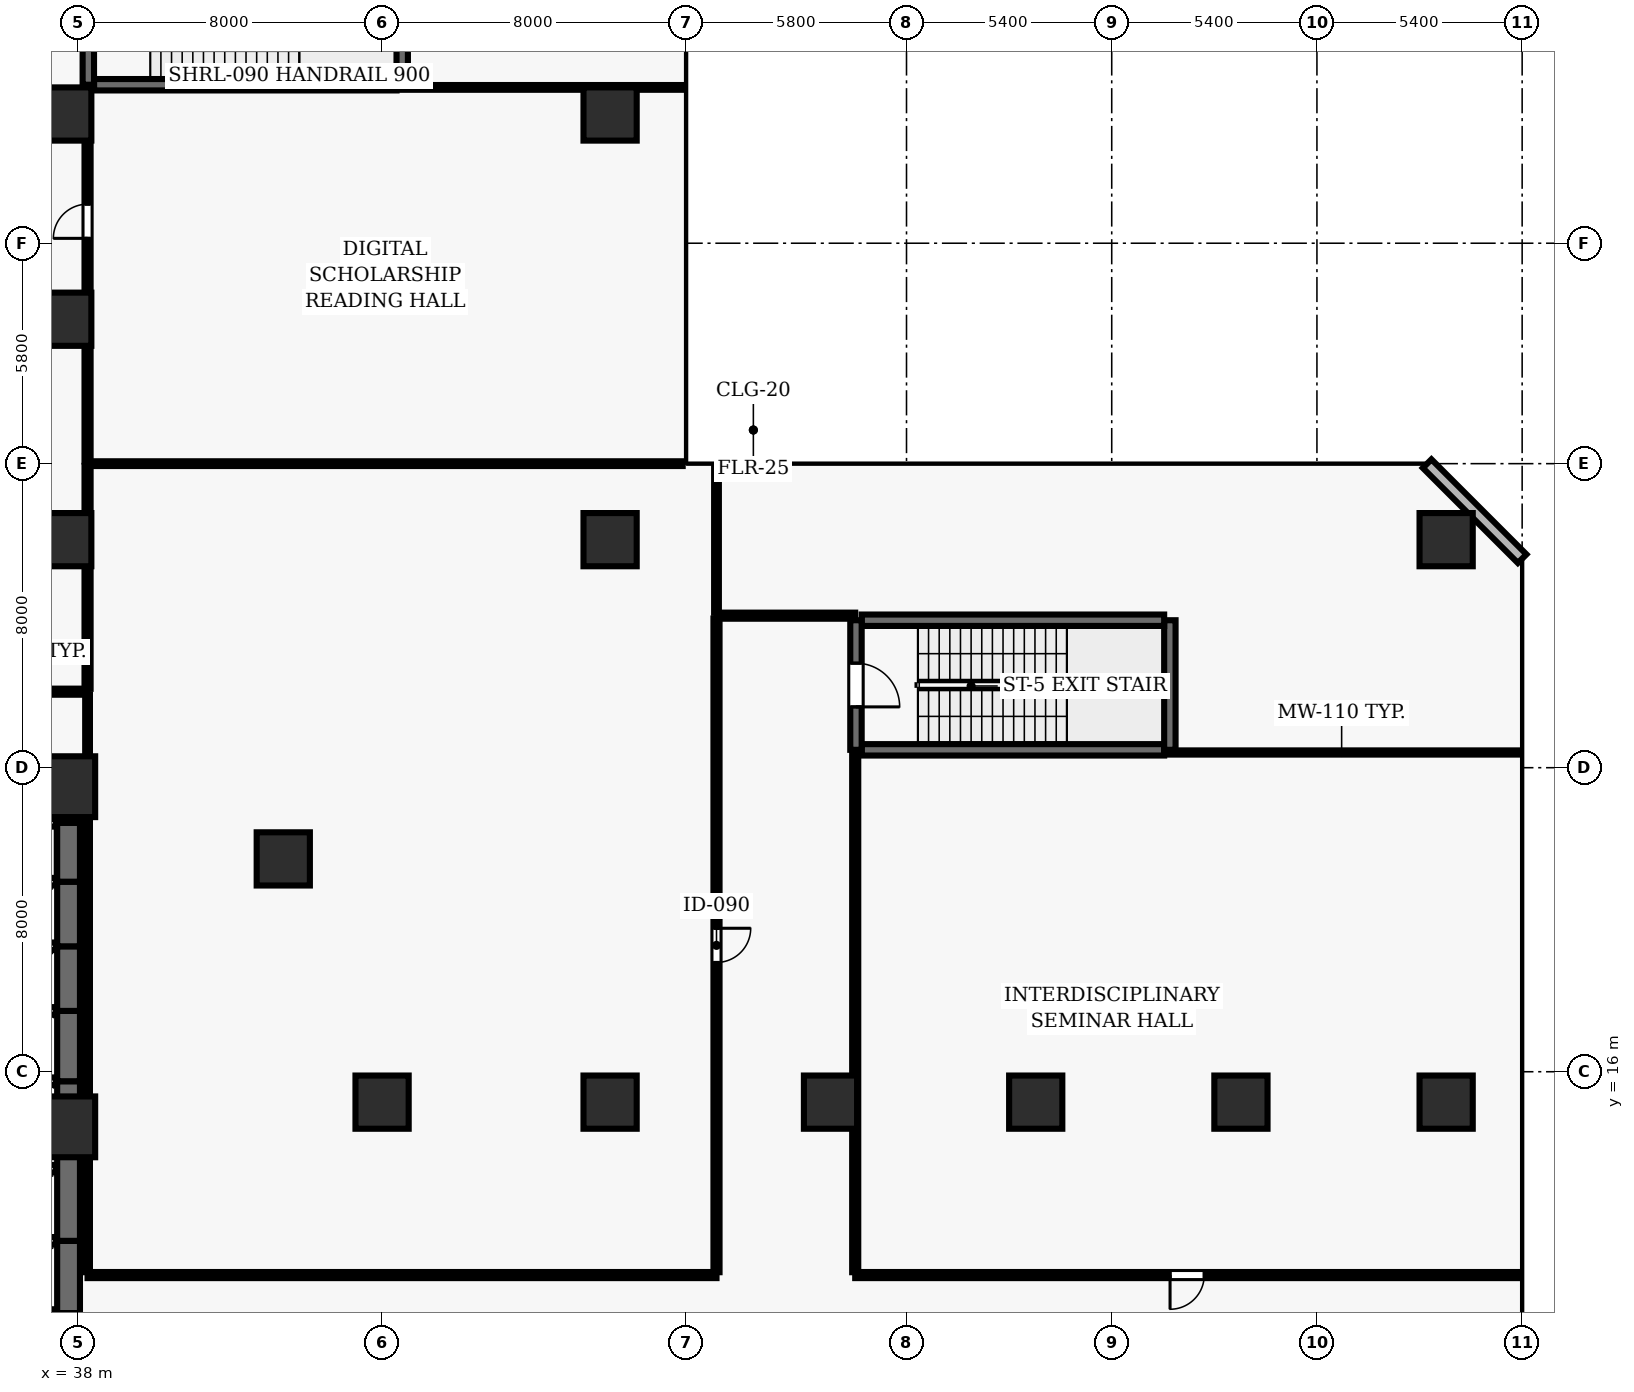
"""IFC4 building model, lengths in metres.
Left out: names, types, materials, properties, quantities, classifications, styles, units other than length and angle.
Written with IfcOpenShell. Run it as: python <this file> out.ifc"""

import sys

from ifc_helpers import new_model, si_unit, direction, frame, frame_2d, origin, origin_2d, place, context, subcontext, project, spatial, rectangle, extrude, element, fill, save


model = new_model("IFC4")
c1 = context("Model", 3, precision=1e-05, world=origin(), true_north=direction((0.0, 1.0)))
c2 = subcontext(c1, "Body", "Model", "MODEL_VIEW")
j1 = project(units=[si_unit("LENGTHUNIT", "METRE"), si_unit("PLANEANGLEUNIT", "RADIAN")], contexts=[c1])
p1 = place(None, origin())
s1 = spatial("IfcSite", under=j1, at=p1, CompositionType="ELEMENT")
p2 = place(p1, origin())
s2 = spatial("IfcBuilding", under=s1, at=p2, CompositionType="ELEMENT")
p3 = place(p2, frame((0.0, 0.0, 15.6)))
s3 = spatial("IfcBuildingStorey", under=s2, at=p3, CompositionType="ELEMENT", Elevation=15.6)
for number, where, z_axis, x_axis in (
    (1, (37.65, 14.55, 0.0), (0.0, 0.0, 1.0), (1.0, 0.0, 0.0)),
    (2, (37.65, 23.5, 0.0), (0.0, 0.0, 1.0), (1.0, 0.0, 0.0)),
):
    element("IfcColumn", number, at=place(p3, frame(where, z_axis=z_axis, x_axis=x_axis)), inside=s3, PredefinedType="COLUMN", context=c2, shape_type="SweptSolid", body=[
        extrude(rectangle(XDim=1.6, YDim=1.6, at=origin_2d()), origin(), (0.0, 0.0, 1.0), 5.2),
    ])
for number, where, z_axis, x_axis in (
    (3, (46.0, 15.2, 0.0), (0.0, 0.0, 1.0), (1.0, 0.0, 0.0)),
    (4, (52.0, 15.2, 0.0), (0.0, 0.0, 1.0), (1.0, 0.0, 0.0)),
    (5, (57.8, 15.2, 0.0), (0.0, 0.0, 1.0), (1.0, 0.0, 0.0)),
    (6, (63.2, 15.2, 0.0), (0.0, 0.0, 1.0), (1.0, 0.0, 0.0)),
    (7, (68.6, 15.2, 0.0), (0.0, 0.0, 1.0), (1.0, 0.0, 0.0)),
    (8, (74.0, 15.2, 0.0), (0.0, 0.0, 1.0), (1.0, 0.0, 0.0)),
    (9, (37.65, 30.0, 0.0), (0.0, 0.0, 1.0), (1.0, 0.0, 0.0)),
    (10, (37.65, 35.8, 0.0), (0.0, 0.0, 1.0), (1.0, 0.0, 0.0)),
    (11, (37.65, 41.2, 0.0), (0.0, 0.0, 1.0), (1.0, 0.0, 0.0)),
    (12, (43.4, 21.6, 0.0), (0.0, 0.0, 1.0), (1.0, 0.0, 0.0)),
    (13, (52.0, 30.0, 0.0), (0.0, 0.0, 1.0), (1.0, 0.0, 0.0)),
    (14, (74.0, 30.0, 0.0), (0.0, 0.0, 1.0), (1.0, 0.0, 0.0)),
    (15, (52.0, 41.2, 0.0), (0.0, 0.0, 1.0), (1.0, 0.0, 0.0)),
):
    element("IfcColumn", number, at=place(p3, frame(where, z_axis=z_axis, x_axis=x_axis)), inside=s3, PredefinedType="COLUMN", context=c2, shape_type="SweptSolid", body=[
        extrude(rectangle(XDim=1.4, YDim=1.4, at=origin_2d()), origin(), (0.0, 0.0, 1.0), 5.2),
    ])
p4 = place(p3, frame((76.0, 29.5, 0.0), z_axis=(0.0, 0.0, 1.0), x_axis=(-0.707106781187, 0.707106781187, 0.0)))
e16 = element("IfcWall", 16, at=p4, inside=s3, PredefinedType="SOLIDWALL", context=c2, shape_type="SweptSolid", body=[
    extrude(rectangle(XDim=3.536, YDim=0.32, at=frame_2d((1.768, 0.0))), origin(), (0.0, 0.0, 1.0), 4.92),
])
p5 = place(p3, frame((38.42, 41.97, 0.0), z_axis=(0.0, 0.0, 1.0), x_axis=(1.0, 0.0, 0.0)))
e17 = element("IfcWall", 17, at=p5, inside=s3, PredefinedType="SHEAR", context=c2, shape_type="SweptSolid", body=[
    extrude(rectangle(XDim=7.96, YDim=0.3, at=frame_2d((3.98, 0.0))), origin(), (0.0, 0.0, 1.0), 4.92),
])
p6 = place(p3, frame((46.53, 41.97, 0.0), z_axis=(0.0, 0.0, 1.0), x_axis=(0.0, 1.0, 0.0)))
e18 = element("IfcWall", 18, at=p6, inside=s3, PredefinedType="SHEAR", context=c2, shape_type="SweptSolid", body=[
    extrude(rectangle(XDim=3.41, YDim=0.3, at=frame_2d((1.705, 0.0))), origin(), (0.0, 0.0, 1.0), 4.92),
])
p7 = place(p3, frame((38.27, 45.92, 0.0), z_axis=(0.0, 0.0, 1.0), x_axis=(0.0, -1.0, 0.0)))
e19 = element("IfcWall", 19, at=p7, inside=s3, PredefinedType="SHEAR", context=c2, shape_type="SweptSolid", body=[
    extrude(rectangle(XDim=3.95, YDim=0.3, at=frame_2d((1.975, 0.0))), origin(), (0.0, 0.0, 1.0), 4.92),
])
p8 = place(p7, frame((1.67, 0.0, 0.0)))
e20 = element("IfcOpeningElement", 20, at=p8, cuts=e19, PredefinedType="OPENING", context=c2, shape_type="SweptSolid", body=[
    extrude(rectangle(XDim=1.15, YDim=2.15, at=frame_2d((0.575, 1.075))), frame((0.0, 0.16, 0.0), z_axis=(0.0, -1.0, 0.0), x_axis=(1.0, 0.0, 0.0)), (0.0, 0.0, 1.0), 0.32),
])
p9 = place(p3, frame((58.62, 24.47, 0.0), z_axis=(0.0, 0.0, 1.0), x_axis=(1.0, 0.0, 0.0)))
e21 = element("IfcWall", 21, at=p9, inside=s3, PredefinedType="SHEAR", context=c2, shape_type="SweptSolid", body=[
    extrude(rectangle(XDim=7.96, YDim=0.3, at=frame_2d((3.98, 0.0))), origin(), (0.0, 0.0, 1.0), 4.92),
])
p10 = place(p3, frame((66.73, 24.47, 0.0), z_axis=(0.0, 0.0, 1.0), x_axis=(0.0, 1.0, 0.0)))
e22 = element("IfcWall", 22, at=p10, inside=s3, PredefinedType="SHEAR", context=c2, shape_type="SweptSolid", body=[
    extrude(rectangle(XDim=3.41, YDim=0.3, at=frame_2d((1.705, 0.0))), origin(), (0.0, 0.0, 1.0), 4.92),
])
p11 = place(p3, frame((66.58, 27.88, 0.0), z_axis=(0.0, 0.0, 1.0), x_axis=(-1.0, 0.0, 0.0)))
e23 = element("IfcWall", 23, at=p11, inside=s3, PredefinedType="SHEAR", context=c2, shape_type="SweptSolid", body=[
    extrude(rectangle(XDim=7.96, YDim=0.3, at=frame_2d((3.98, 0.0))), origin(), (0.0, 0.0, 1.0), 4.92),
])
p12 = place(p3, frame((58.47, 27.88, 0.0), z_axis=(0.0, 0.0, 1.0), x_axis=(0.0, -1.0, 0.0)))
e24 = element("IfcWall", 24, at=p12, inside=s3, PredefinedType="SHEAR", context=c2, shape_type="SweptSolid", body=[
    extrude(rectangle(XDim=3.41, YDim=0.3, at=frame_2d((1.705, 0.0))), origin(), (0.0, 0.0, 1.0), 4.92),
])
p13 = place(p12, frame((1.13, 0.0, 0.0)))
e25 = element("IfcOpeningElement", 25, at=p13, cuts=e24, PredefinedType="OPENING", context=c2, shape_type="SweptSolid", body=[
    extrude(rectangle(XDim=1.15, YDim=2.15, at=frame_2d((0.575, 1.075))), frame((0.0, 0.16, 0.0), z_axis=(0.0, -1.0, 0.0), x_axis=(1.0, 0.0, 0.0)), (0.0, 0.0, 1.0), 0.32),
])
p14 = place(p3, frame((37.75, 9.65, 0.0), z_axis=(0.0, 0.0, 1.0), x_axis=(0.0, 1.0, 0.0)))
e26 = element("IfcWall", 26, at=p14, inside=s3, PredefinedType="SHEAR", context=c2, shape_type="SweptSolid", body=[
    extrude(rectangle(XDim=1.9, YDim=0.6, at=frame_2d((0.95, 0.0))), origin(), (0.0, 0.0, 1.0), 4.92),
])
for number, where, z_axis, x_axis in (
    (27, (35.28, 9.65, 0.0), (0.0, 0.0, 1.0), (1.0, 0.0, 0.0)),
    (28, (37.42, 11.55, 0.0), (0.0, 0.0, 1.0), (-1.0, 0.0, 0.0)),
):
    element("IfcWall", number, at=place(p3, frame(where, z_axis=z_axis, x_axis=x_axis)), inside=s3, PredefinedType="SOLIDWALL", context=c2, shape_type="SweptSolid", body=[
        extrude(rectangle(XDim=2.14, YDim=0.2, at=frame_2d((1.07, 0.0))), origin(), (0.0, 0.0, 1.0), 4.92),
    ])
p15 = place(p3, frame((37.75, 11.55, 0.0), z_axis=(0.0, 0.0, 1.0), x_axis=(0.0, 1.0, 0.0)))
e29 = element("IfcWall", 29, at=p15, inside=s3, PredefinedType="SHEAR", context=c2, shape_type="SweptSolid", body=[
    extrude(rectangle(XDim=2.35, YDim=0.6, at=frame_2d((1.175, 0.0))), origin(), (0.0, 0.0, 1.0), 4.92),
])
p16 = place(p3, frame((37.42, 13.45, 0.0), z_axis=(0.0, 0.0, 1.0), x_axis=(-1.0, 0.0, 0.0)))
e30 = element("IfcWall", 30, at=p16, inside=s3, PredefinedType="SOLIDWALL", context=c2, shape_type="SweptSolid", body=[
    extrude(rectangle(XDim=2.14, YDim=0.2, at=frame_2d((1.07, 0.0))), origin(), (0.0, 0.0, 1.0), 4.92),
])
p17 = place(p3, frame((37.75, 13.9, 0.0), z_axis=(0.0, 0.0, 1.0), x_axis=(0.0, 1.0, 0.0)))
e31 = element("IfcWall", 31, at=p17, inside=s3, PredefinedType="SHEAR", context=c2, shape_type="SweptSolid", body=[
    extrude(rectangle(XDim=1.85, YDim=0.6, at=frame_2d((0.925, 0.0))), origin(), (0.0, 0.0, 1.0), 4.92),
])
for number, where, z_axis, x_axis in (
    (32, (35.28, 13.9, 0.0), (0.0, 0.0, 1.0), (1.0, 0.0, 0.0)),
    (33, (37.42, 15.75, 0.0), (0.0, 0.0, 1.0), (-1.0, 0.0, 0.0)),
):
    element("IfcWall", number, at=place(p3, frame(where, z_axis=z_axis, x_axis=x_axis)), inside=s3, PredefinedType="SOLIDWALL", context=c2, shape_type="SweptSolid", body=[
        extrude(rectangle(XDim=2.14, YDim=0.2, at=frame_2d((1.07, 0.0))), origin(), (0.0, 0.0, 1.0), 4.92),
    ])
p18 = place(p3, frame((37.75, 15.75, 0.0), z_axis=(0.0, 0.0, 1.0), x_axis=(0.0, 1.0, 0.0)))
e34 = element("IfcWall", 34, at=p18, inside=s3, PredefinedType="SHEAR", context=c2, shape_type="SweptSolid", body=[
    extrude(rectangle(XDim=1.85, YDim=0.6, at=frame_2d((0.925, 0.0))), origin(), (0.0, 0.0, 1.0), 4.92),
])
p19 = place(p3, frame((37.42, 17.6, 0.0), z_axis=(0.0, 0.0, 1.0), x_axis=(-1.0, 0.0, 0.0)))
e35 = element("IfcWall", 35, at=p19, inside=s3, PredefinedType="SOLIDWALL", context=c2, shape_type="SweptSolid", body=[
    extrude(rectangle(XDim=2.14, YDim=0.2, at=frame_2d((1.07, 0.0))), origin(), (0.0, 0.0, 1.0), 4.92),
])
p20 = place(p3, frame((37.75, 17.6, 0.0), z_axis=(0.0, 0.0, 1.0), x_axis=(0.0, 1.0, 0.0)))
e36 = element("IfcWall", 36, at=p20, inside=s3, PredefinedType="SHEAR", context=c2, shape_type="SweptSolid", body=[
    extrude(rectangle(XDim=1.7, YDim=0.6, at=frame_2d((0.85, 0.0))), origin(), (0.0, 0.0, 1.0), 4.92),
])
p21 = place(p3, frame((37.42, 19.3, 0.0), z_axis=(0.0, 0.0, 1.0), x_axis=(-1.0, 0.0, 0.0)))
e37 = element("IfcWall", 37, at=p21, inside=s3, PredefinedType="SOLIDWALL", context=c2, shape_type="SweptSolid", body=[
    extrude(rectangle(XDim=2.14, YDim=0.2, at=frame_2d((1.07, 0.0))), origin(), (0.0, 0.0, 1.0), 4.92),
])
p22 = place(p3, frame((37.75, 19.3, 0.0), z_axis=(0.0, 0.0, 1.0), x_axis=(0.0, 1.0, 0.0)))
e38 = element("IfcWall", 38, at=p22, inside=s3, PredefinedType="SHEAR", context=c2, shape_type="SweptSolid", body=[
    extrude(rectangle(XDim=1.7, YDim=0.6, at=frame_2d((0.85, 0.0))), origin(), (0.0, 0.0, 1.0), 4.92),
])
p23 = place(p3, frame((37.42, 21.0, 0.0), z_axis=(0.0, 0.0, 1.0), x_axis=(-1.0, 0.0, 0.0)))
e39 = element("IfcWall", 39, at=p23, inside=s3, PredefinedType="SOLIDWALL", context=c2, shape_type="SweptSolid", body=[
    extrude(rectangle(XDim=2.14, YDim=0.2, at=frame_2d((1.07, 0.0))), origin(), (0.0, 0.0, 1.0), 4.92),
])
p24 = place(p3, frame((37.75, 21.0, 0.0), z_axis=(0.0, 0.0, 1.0), x_axis=(0.0, 1.0, 0.0)))
e40 = element("IfcWall", 40, at=p24, inside=s3, PredefinedType="SHEAR", context=c2, shape_type="SweptSolid", body=[
    extrude(rectangle(XDim=1.55, YDim=0.6, at=frame_2d((0.775, 0.0))), origin(), (0.0, 0.0, 1.0), 4.92),
])
p25 = place(p3, frame((37.42, 22.55, 0.0), z_axis=(0.0, 0.0, 1.0), x_axis=(-1.0, 0.0, 0.0)))
e41 = element("IfcWall", 41, at=p25, inside=s3, PredefinedType="SOLIDWALL", context=c2, shape_type="SweptSolid", body=[
    extrude(rectangle(XDim=2.14, YDim=0.2, at=frame_2d((1.07, 0.0))), origin(), (0.0, 0.0, 1.0), 4.92),
])
p26 = place(p3, frame((37.75, 22.55, 0.0), z_axis=(0.0, 0.0, 1.0), x_axis=(0.0, 1.0, 0.0)))
e42 = element("IfcWall", 42, at=p26, inside=s3, PredefinedType="SHEAR", context=c2, shape_type="SweptSolid", body=[
    extrude(rectangle(XDim=1.5, YDim=0.6, at=frame_2d((0.75, 0.0))), origin(), (0.0, 0.0, 1.0), 4.92),
])
p27 = place(p3, frame((37.42, 24.05, 0.0), z_axis=(0.0, 0.0, 1.0), x_axis=(-1.0, 0.0, 0.0)))
e43 = element("IfcWall", 43, at=p27, inside=s3, PredefinedType="SOLIDWALL", context=c2, shape_type="SweptSolid", body=[
    extrude(rectangle(XDim=2.14, YDim=0.2, at=frame_2d((1.07, 0.0))), origin(), (0.0, 0.0, 1.0), 4.92),
])
p28 = place(p3, frame((35.15, 26.0, 0.0), z_axis=(0.0, 0.0, 1.0), x_axis=(1.0, 0.0, 0.0)))
e44 = element("IfcWall", 44, at=p28, inside=s3, PredefinedType="PARTITIONING", context=c2, shape_type="SweptSolid", body=[
    extrude(rectangle(XDim=3.1, YDim=0.16, at=frame_2d((1.55, 0.0))), origin(), (0.0, 0.0, 1.0), 4.92),
])
p29 = place(p3, frame((38.25, 32.0, 0.0), z_axis=(0.0, 0.0, 1.0), x_axis=(1.0, 0.0, 0.0)))
e45 = element("IfcWall", 45, at=p29, inside=s3, PredefinedType="PARTITIONING", context=c2, shape_type="SweptSolid", body=[
    extrude(rectangle(XDim=15.66, YDim=0.125, at=frame_2d((7.83, 0.0))), origin(), (0.0, 0.0, 1.0), 4.92),
])
p30 = place(p3, frame((53.91, 41.9, 0.0), z_axis=(0.0, 0.0, 1.0), x_axis=(-1.0, 0.0, 0.0)))
e46 = element("IfcWall", 46, at=p30, inside=s3, PredefinedType="PARTITIONING", context=c2, shape_type="SweptSolid", body=[
    extrude(rectangle(XDim=7.53, YDim=0.125, at=frame_2d((3.765, 0.0))), origin(), (0.0, 0.0, 1.0), 4.92),
])
p31 = place(p3, frame((54.8, 10.65, 0.0), z_axis=(0.0, 0.0, 1.0), x_axis=(-1.0, 0.0, 0.0)))
e47 = element("IfcWall", 47, at=p31, inside=s3, PredefinedType="PARTITIONING", context=c2, shape_type="SweptSolid", body=[
    extrude(rectangle(XDim=16.55, YDim=0.16, at=frame_2d((8.275, 0.0))), origin(), (0.0, 0.0, 1.0), 4.451),
])
p32 = place(p3, frame((58.45, 28.0, 0.0), z_axis=(0.0, 0.0, 1.0), x_axis=(-1.0, 0.0, 0.0)))
e48 = element("IfcWall", 48, at=p32, inside=s3, PredefinedType="PARTITIONING", context=c2, shape_type="SweptSolid", body=[
    extrude(rectangle(XDim=3.65, YDim=0.16, at=frame_2d((1.825, 0.0))), origin(), (0.0, 0.0, 1.0), 4.92),
])
p33 = place(p3, frame((75.92, 10.65, 0.0), z_axis=(0.0, 0.0, 1.0), x_axis=(-1.0, 0.0, 0.0)))
e49 = element("IfcWall", 49, at=p33, inside=s3, PredefinedType="PARTITIONING", context=c2, shape_type="SweptSolid", body=[
    extrude(rectangle(XDim=17.47, YDim=0.16, at=frame_2d((8.735, 0.0))), origin(), (0.0, 0.0, 1.0), 4.451),
])
p34 = place(p33, frame((8.285, 0.0, 0.0)))
e50 = element("IfcOpeningElement", 50, at=p34, cuts=e49, PredefinedType="OPENING", context=c2, shape_type="SweptSolid", body=[
    extrude(rectangle(XDim=0.9, YDim=2.1, at=frame_2d((0.45, 1.05))), frame((0.0, 0.09, 0.0), z_axis=(0.0, -1.0, 0.0), x_axis=(1.0, 0.0, 0.0)), (0.0, 0.0, 1.0), 0.18),
])
p35 = place(p3, frame((75.92, 24.4, 0.0), z_axis=(0.0, 0.0, 1.0), x_axis=(-1.0, 0.0, 0.0)))
e51 = element("IfcWall", 51, at=p35, inside=s3, PredefinedType="MOVABLE", context=c2, shape_type="SweptSolid", body=[
    extrude(rectangle(XDim=9.34, YDim=0.11, at=frame_2d((4.67, 0.0))), origin(), (0.0, 0.0, 1.0), 4.92),
])
p36 = place(p3, frame((38.25, 25.925, 0.0), z_axis=(0.0, 0.0, 1.0), x_axis=(0.0, -1.0, 0.0)))
e52 = element("IfcWall", 52, at=p36, inside=s3, PredefinedType="PARTITIONING", context=c2, shape_type="SweptSolid", body=[
    extrude(rectangle(XDim=15.2, YDim=0.125, at=frame_2d((7.6, 0.0))), origin(), (0.0, 0.0, 1.0), 4.92),
])
p37 = place(p3, frame((38.25, 26.075, 0.0), z_axis=(0.0, 0.0, 1.0), x_axis=(0.0, 1.0, 0.0)))
e53 = element("IfcWall", 53, at=p37, inside=s3, PredefinedType="PARTITIONING", context=c2, shape_type="SweptSolid", body=[
    extrude(rectangle(XDim=5.867, YDim=0.16, at=frame_2d((2.934, 0.0))), origin(), (0.0, 0.0, 1.0), 4.92),
])
p38 = place(p3, frame((38.25, 32.057, 0.0), z_axis=(0.0, 0.0, 1.0), x_axis=(0.0, 1.0, 0.0)))
e54 = element("IfcWall", 54, at=p38, inside=s3, PredefinedType="PARTITIONING", context=c2, shape_type="SweptSolid", body=[
    extrude(rectangle(XDim=9.843, YDim=0.16, at=frame_2d((4.921, 0.0))), origin(), (0.0, 0.0, 1.0), 4.92),
])
p39 = place(p38, frame((5.871, 0.0, 0.0)))
e55 = element("IfcOpeningElement", 55, at=p39, cuts=e54, PredefinedType="OPENING", context=c2, shape_type="SweptSolid", body=[
    extrude(rectangle(XDim=0.9, YDim=2.1, at=frame_2d((0.45, 1.05))), frame((0.0, 0.09, 0.0), z_axis=(0.0, -1.0, 0.0), x_axis=(1.0, 0.0, 0.0)), (0.0, 0.0, 1.0), 0.18),
])
p40 = place(p3, frame((54.8, 28.075, 0.0), z_axis=(0.0, 0.0, 1.0), x_axis=(0.0, 1.0, 0.0)))
e56 = element("IfcWall", 56, at=p40, inside=s3, PredefinedType="PARTITIONING", context=c2, shape_type="SweptSolid", body=[
    extrude(rectangle(XDim=3.835, YDim=0.125, at=frame_2d((1.917, 0.0))), origin(), (0.0, 0.0, 1.0), 4.451),
])
p41 = place(p3, frame((54.8, 27.925, 0.0), z_axis=(0.0, 0.0, 1.0), x_axis=(0.0, -1.0, 0.0)))
e57 = element("IfcWall", 57, at=p41, inside=s3, PredefinedType="PARTITIONING", context=c2, shape_type="SweptSolid", body=[
    extrude(rectangle(XDim=17.2, YDim=0.16, at=frame_2d((8.6, 0.0))), origin(), (0.0, 0.0, 1.0), 4.451),
])
p42 = place(p41, frame((8.15, 0.0, 0.0)))
e58 = element("IfcOpeningElement", 58, at=p42, cuts=e57, PredefinedType="OPENING", context=c2, shape_type="SweptSolid", body=[
    extrude(rectangle(XDim=0.9, YDim=2.1, at=frame_2d((0.45, 1.05))), frame((0.0, 0.09, 0.0), z_axis=(0.0, -1.0, 0.0), x_axis=(1.0, 0.0, 0.0)), (0.0, 0.0, 1.0), 0.18),
])
p43 = place(p3, frame((58.45, 10.725, 0.0), z_axis=(0.0, 0.0, 1.0), x_axis=(0.0, 1.0, 0.0)))
e59 = element("IfcWall", 59, at=p43, inside=s3, PredefinedType="PARTITIONING", context=c2, shape_type="SweptSolid", body=[
    extrude(rectangle(XDim=13.675, YDim=0.16, at=frame_2d((6.837, 0.0))), origin(), (0.0, 0.0, 1.0), 4.92),
])
p44 = place(p13, origin())
e60 = element("IfcDoor", 60, at=p44, inside=s3, OperationType="SINGLE_SWING_RIGHT", PredefinedType="DOOR", context=c2, shape_type="SweptSolid", body=[
    extrude(rectangle(XDim=1.15, YDim=2.15, at=frame_2d((0.575, 1.075))), frame((0.0, 0.025, 0.0), z_axis=(0.0, -1.0, 0.0), x_axis=(1.0, 0.0, 0.0)), (0.0, 0.0, 1.0), 0.05),
])
fill(e25, e60)
p45 = place(p42, origin())
e61 = element("IfcDoor", 61, at=p45, inside=s3, OperationType="SINGLE_SWING_LEFT", PredefinedType="DOOR", context=c2, shape_type="SweptSolid", body=[
    extrude(rectangle(XDim=0.9, YDim=2.1, at=frame_2d((0.45, 1.05))), frame((0.0, 0.025, 0.0), z_axis=(0.0, -1.0, 0.0), x_axis=(1.0, 0.0, 0.0)), (0.0, 0.0, 1.0), 0.05),
])
fill(e58, e61)
p46 = place(p34, origin())
e62 = element("IfcDoor", 62, at=p46, inside=s3, OperationType="SINGLE_SWING_RIGHT", PredefinedType="DOOR", context=c2, shape_type="SweptSolid", body=[
    extrude(rectangle(XDim=0.9, YDim=2.1, at=frame_2d((0.45, 1.05))), frame((0.0, 0.025, 0.0), z_axis=(0.0, -1.0, 0.0), x_axis=(1.0, 0.0, 0.0)), (0.0, 0.0, 1.0), 0.05),
])
fill(e50, e62)
p47 = place(p39, origin())
e63 = element("IfcDoor", 63, at=p47, inside=s3, OperationType="SINGLE_SWING_LEFT", PredefinedType="DOOR", context=c2, shape_type="SweptSolid", body=[
    extrude(rectangle(XDim=0.9, YDim=2.1, at=frame_2d((0.45, 1.05))), frame((0.0, 0.025, 0.0), z_axis=(0.0, -1.0, 0.0), x_axis=(1.0, 0.0, 0.0)), (0.0, 0.0, 1.0), 0.05),
])
fill(e55, e63)
save(model, sys.argv[1])
